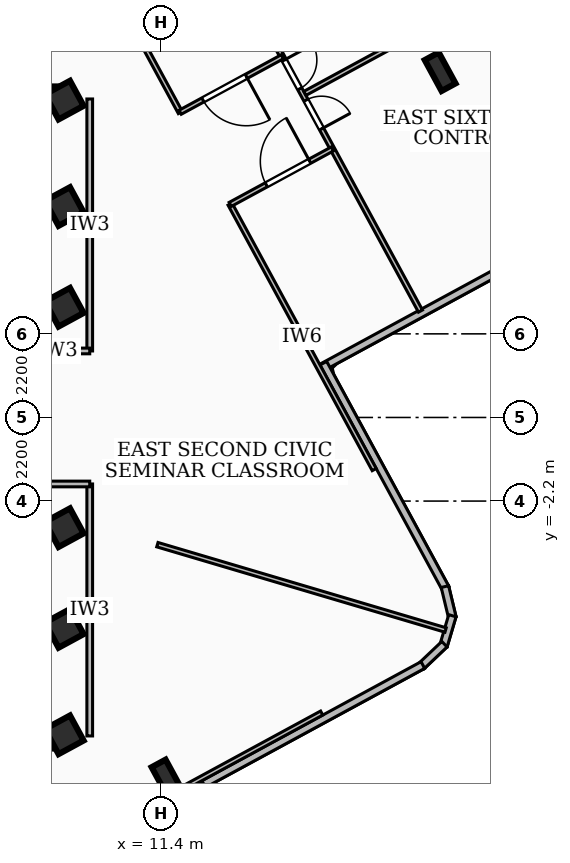
"""IFC4 building model, lengths in metres.
Left out: names, types, materials, properties, quantities, classifications, styles, units other than length and angle.
Written with IfcOpenShell. Run it as: python <this file> out.ifc"""

import sys

from ifc_helpers import new_model, si_unit, direction, frame, frame_2d, origin, origin_2d, place, context, subcontext, project, spatial, rectangle, i_section, extrude, element, fill, save


model = new_model("IFC4")
c1 = context("Model", 3, precision=1e-05, world=origin(), true_north=direction((0.0, 1.0)))
c2 = subcontext(c1, "Body", "Model", "MODEL_VIEW")
j1 = project(units=[si_unit("LENGTHUNIT", "METRE"), si_unit("PLANEANGLEUNIT", "RADIAN")], contexts=[c1])
p1 = place(None, origin())
s1 = spatial("IfcSite", under=j1, at=p1, CompositionType="ELEMENT")
p2 = place(p1, origin())
s2 = spatial("IfcBuilding", under=s1, at=p2, CompositionType="ELEMENT")
p3 = place(p2, frame((0.0, 0.0, 200.88)))
s3 = spatial("IfcBuildingStorey", under=s2, at=p3, CompositionType="ELEMENT", Elevation=200.88)
for number, where, z_axis, x_axis in (
    (1, (-8.78, 8.51, 0.0), (0.0, 0.0, 1.0), (1.0, 0.0, 0.0)),
    (2, (8.78, -8.51, 0.0), (0.0, 0.0, 1.0), (-1.0, 0.0, 0.0)),
):
    element("IfcWall", number, at=place(p3, frame(where, z_axis=z_axis, x_axis=x_axis)), inside=s3, PredefinedType="SHEAR", context=c2, shape_type="SweptSolid", body=[
        extrude(rectangle(XDim=17.56, YDim=0.4, at=frame_2d((8.78, 0.0))), origin(), (0.0, 0.0, 1.0), 4.06),
    ])
for number, where, z_axis, x_axis in (
    (3, (8.85, -5.55, 0.0), (0.0, 0.0, 1.0), (0.879, 0.477, 0.0)),
    (4, (8.85, -2.9, 0.0), (0.0, 0.0, 1.0), (0.879, 0.477, 0.0)),
    (5, (8.85, 2.9, 0.0), (0.0, 0.0, 1.0), (0.879, 0.477, 0.0)),
    (6, (8.85, 5.55, 0.0), (0.0, 0.0, 1.0), (0.879, 0.477, 0.0)),
    (7, (8.85, -8.35, 0.0), (0.0, 0.0, 1.0), (0.879, 0.477, 0.0)),
    (8, (8.85, 8.35, 0.0), (0.0, 0.0, 1.0), (0.879, 0.477, 0.0)),
):
    element("IfcColumn", number, at=place(p3, frame(where, z_axis=z_axis, x_axis=x_axis)), inside=s3, PredefinedType="COLUMN", context=c2, shape_type="SweptSolid", body=[
        extrude(rectangle(XDim=0.75, YDim=0.75, at=origin_2d()), origin(), (0.0, 0.0, 1.0), 4.32),
    ])
for number, where, z_axis, x_axis in (
    (9, (18.741, 9.097, 0.0), (0.0, 0.0, 1.0), (0.879, 0.477, 0.0)),
    (10, (11.554, -9.51, 0.0), (0.0, 0.0, 1.0), (0.879, 0.477, 0.0)),
):
    element("IfcColumn", number, at=place(p3, frame(where, z_axis=z_axis, x_axis=x_axis)), inside=s3, PredefinedType="COLUMN", context=c2, shape_type="SweptSolid", body=[
        extrude(i_section(OverallWidth=0.418, OverallDepth=0.927, WebThickness=0.019, FlangeThickness=0.032, at=origin_2d()), origin(), (0.0, 0.0, 1.0), 4.32),
    ])
p4 = place(p3, frame((19.411, 16.015, 0.0), z_axis=(0.0, 0.0, 1.0), x_axis=(0.477136087368, -0.878829422659, 0.0)))
e11 = element("IfcWall", 11, at=p4, inside=s3, PredefinedType="SOLIDWALL", context=c2, shape_type="SweptSolid", body=[
    extrude(rectangle(XDim=9.624, YDim=0.2, at=frame_2d((4.812, 0.0))), origin(), (0.0, 0.0, 1.0), 4.06),
])
p5 = place(p4, frame((6.607, 0.0, 0.85)))
e12 = element("IfcOpeningElement", 12, at=p5, cuts=e11, PredefinedType="OPENING", context=c2, shape_type="SweptSolid", body=[
    extrude(rectangle(XDim=1.8, YDim=2.0, at=frame_2d((0.9, 1.0))), frame((0.0, 0.11, 0.0), z_axis=(0.0, -1.0, 0.0), x_axis=(1.0, 0.0, 0.0)), (0.0, 0.0, 1.0), 0.22),
])
p6 = place(p3, frame((23.405, 5.539, 0.0), z_axis=(0.0, 0.0, 1.0), x_axis=(-0.878806785067, -0.477177780832, 0.0)))
e13 = element("IfcWall", 13, at=p6, inside=s3, PredefinedType="SOLIDWALL", context=c2, shape_type="SweptSolid", body=[
    extrude(rectangle(XDim=8.842, YDim=0.2, at=frame_2d((4.421, 0.0))), origin(), (0.0, 0.0, 1.0), 4.06),
])
p7 = place(p6, frame((0.85, 0.0, 0.85)))
e14 = element("IfcOpeningElement", 14, at=p7, cuts=e13, PredefinedType="OPENING", context=c2, shape_type="SweptSolid", body=[
    extrude(rectangle(XDim=1.8, YDim=1.8, at=frame_2d((0.9, 0.9))), frame((0.0, 0.11, 0.0), z_axis=(0.0, -1.0, 0.0), x_axis=(1.0, 0.0, 0.0)), (0.0, 0.0, 1.0), 0.22),
])
p8 = place(p3, frame((15.667, 1.428, 0.0), z_axis=(0.0, 0.0, 1.0), x_axis=(0.477219733162, -0.878784004338, 0.0)))
e15 = element("IfcWall", 15, at=p8, inside=s3, PredefinedType="SOLIDWALL", context=c2, shape_type="SweptSolid", body=[
    extrude(rectangle(XDim=6.741, YDim=0.2, at=frame_2d((3.371, 0.0))), origin(), (0.0, 0.0, 1.0), 4.06),
])
p9 = place(p3, frame((18.866, -4.45, 0.0), z_axis=(0.0, 0.0, 1.0), x_axis=(0.233890685703, -0.972262900219, 0.0)))
e16 = element("IfcWall", 16, at=p9, inside=s3, PredefinedType="SOLIDWALL", context=c2, shape_type="SweptSolid", body=[
    extrude(rectangle(XDim=0.838, YDim=0.2, at=frame_2d((0.419, 0.0))), origin(), (0.0, 0.0, 1.0), 4.06),
])
p10 = place(p3, frame((19.063, -5.217, 0.0), z_axis=(0.0, 0.0, 1.0), x_axis=(-0.283866368736, -0.958863850972, 0.0)))
e17 = element("IfcWall", 17, at=p10, inside=s3, PredefinedType="SOLIDWALL", context=c2, shape_type="SweptSolid", body=[
    extrude(rectangle(XDim=0.824, YDim=0.2, at=frame_2d((0.412, 0.0))), origin(), (0.0, 0.0, 1.0), 4.06),
])
p11 = place(p3, frame((18.854, -5.966, 0.0), z_axis=(0.0, 0.0, 1.0), x_axis=(-0.725362992084, -0.688366566384, 0.0)))
e18 = element("IfcWall", 18, at=p11, inside=s3, PredefinedType="SOLIDWALL", context=c2, shape_type="SweptSolid", body=[
    extrude(rectangle(XDim=0.838, YDim=0.2, at=frame_2d((0.419, 0.0))), origin(), (0.0, 0.0, 1.0), 4.06),
])
p12 = place(p3, frame((18.286, -6.514, 0.0), z_axis=(0.0, 0.0, 1.0), x_axis=(-0.878808744224, -0.477174172682, 0.0)))
e19 = element("IfcWall", 19, at=p12, inside=s3, PredefinedType="SOLIDWALL", context=c2, shape_type="SweptSolid", body=[
    extrude(rectangle(XDim=6.742, YDim=0.2, at=frame_2d((3.371, 0.0))), origin(), (0.0, 0.0, 1.0), 4.06),
])
p13 = place(p3, frame((12.393, -9.623, 0.0), z_axis=(0.0, 0.0, 1.0), x_axis=(0.47719284897, -0.878798603146, 0.0)))
e20 = element("IfcWall", 20, at=p13, inside=s3, PredefinedType="SOLIDWALL", context=c2, shape_type="SweptSolid", body=[
    extrude(rectangle(XDim=4.641, YDim=0.2, at=frame_2d((2.321, 0.0))), origin(), (0.0, 0.0, 1.0), 4.06),
])
p14 = place(p3, frame((9.52, 1.75, 0.0), z_axis=(0.0, 0.0, 1.0), x_axis=(0.0, 1.0, 0.0)))
e21 = element("IfcWall", 21, at=p14, inside=s3, PredefinedType="PARTITIONING", context=c2, shape_type="SweptSolid", body=[
    extrude(rectangle(XDim=6.63, YDim=0.15, at=frame_2d((3.315, 0.0))), origin(), (0.0, 0.0, 1.0), 3.43),
])
p15 = place(p3, frame((7.85, 1.75, 0.0), z_axis=(0.0, 0.0, 1.0), x_axis=(1.0, 0.0, 0.0)))
e22 = element("IfcWall", 22, at=p15, inside=s3, PredefinedType="PARTITIONING", context=c2, shape_type="SweptSolid", body=[
    extrude(rectangle(XDim=1.67, YDim=0.15, at=frame_2d((0.835, 0.0))), origin(), (0.0, 0.0, 1.0), 3.29),
])
p16 = place(p3, frame((9.52, -8.38, 0.0), z_axis=(0.0, 0.0, 1.0), x_axis=(0.0, 1.0, 0.0)))
e23 = element("IfcWall", 23, at=p16, inside=s3, PredefinedType="PARTITIONING", context=c2, shape_type="SweptSolid", body=[
    extrude(rectangle(XDim=6.63, YDim=0.15, at=frame_2d((3.315, 0.0))), origin(), (0.0, 0.0, 1.0), 4.06),
])
p17 = place(p3, frame((7.85, -1.75, 0.0), z_axis=(0.0, 0.0, 1.0), x_axis=(1.0, 0.0, 0.0)))
e24 = element("IfcWall", 24, at=p17, inside=s3, PredefinedType="PARTITIONING", context=c2, shape_type="SweptSolid", body=[
    extrude(rectangle(XDim=1.67, YDim=0.15, at=frame_2d((0.835, 0.0))), origin(), (0.0, 0.0, 1.0), 3.29),
])
p18 = place(p3, frame((11.3, -3.347, 0.0), z_axis=(0.0, 0.0, 1.0), x_axis=(0.958832980981, -0.283970622747, 0.0)))
e25 = element("IfcWall", 25, at=p18, inside=s3, PredefinedType="PARTITIONING", context=c2, shape_type="SweptSolid", body=[
    extrude(rectangle(XDim=7.91, YDim=0.12, at=frame_2d((3.955, 0.0))), origin(), (0.0, 0.0, 1.0), 4.06),
])
p19 = place(p3, frame((11.905, 8.023, 0.0), z_axis=(0.0, 0.0, 1.0), x_axis=(-0.477237565532, 0.878774320315, 0.0)))
e26 = element("IfcWall", 26, at=p19, inside=s3, PredefinedType="PARTITIONING", context=c2, shape_type="SweptSolid", body=[
    extrude(rectangle(XDim=7.95, YDim=0.12, at=frame_2d((3.975, 0.0))), origin(), (0.0, 0.0, 1.0), 3.43),
])
p20 = place(p3, frame((17.006, -1.372, 0.0), z_axis=(0.0, 0.0, 1.0), x_axis=(-0.477209766936, 0.878789416379, 0.0)))
e27 = element("IfcWall", 27, at=p20, inside=s3, PredefinedType="PARTITIONING", context=c2, shape_type="SweptSolid", body=[
    extrude(rectangle(XDim=7.951, YDim=0.12, at=frame_2d((3.975, 0.0))), origin(), (0.0, 0.0, 1.0), 4.06),
])
p21 = place(p3, frame((14.589, 9.491, 0.0), z_axis=(0.0, 0.0, 1.0), x_axis=(-0.878839093996, -0.477118273454, 0.0)))
e28 = element("IfcWall", 28, at=p21, inside=s3, PredefinedType="PARTITIONING", context=c2, shape_type="SweptSolid", body=[
    extrude(rectangle(XDim=3.06, YDim=0.12, at=frame_2d((1.53, 0.0))), origin(), (0.0, 0.0, 1.0), 3.43),
])
p22 = place(p21, frame((1.08, 0.0, 0.0)))
e29 = element("IfcOpeningElement", 29, at=p22, cuts=e28, PredefinedType="OPENING", context=c2, shape_type="SweptSolid", body=[
    extrude(rectangle(XDim=1.3, YDim=2.1, at=frame_2d((0.65, 1.05))), frame((0.0, 0.07, 0.0), z_axis=(0.0, -1.0, 0.0), x_axis=(1.0, 0.0, 0.0)), (0.0, 0.0, 1.0), 0.14),
])
p23 = place(p3, frame((13.217, 5.606, 0.0), z_axis=(0.0, 0.0, 1.0), x_axis=(0.87882092953, 0.477151730397, 0.0)))
e30 = element("IfcWall", 30, at=p23, inside=s3, PredefinedType="PARTITIONING", context=c2, shape_type="SweptSolid", body=[
    extrude(rectangle(XDim=3.06, YDim=0.12, at=frame_2d((1.53, 0.0))), origin(), (0.0, 0.0, 1.0), 4.06),
])
p24 = place(p23, frame((1.08, 0.0, 0.0)))
e31 = element("IfcOpeningElement", 31, at=p24, cuts=e30, PredefinedType="OPENING", context=c2, shape_type="SweptSolid", body=[
    extrude(rectangle(XDim=1.3, YDim=2.1, at=frame_2d((0.65, 1.05))), frame((0.0, 0.07, 0.0), z_axis=(0.0, -1.0, 0.0), x_axis=(1.0, 0.0, 0.0)), (0.0, 0.0, 1.0), 0.14),
])
p25 = place(p3, frame((15.181, 8.527, 0.0), z_axis=(0.0, 0.0, 1.0), x_axis=(0.878776100726, 0.477234287109, 0.0)))
e32 = element("IfcWall", 32, at=p25, inside=s3, PredefinedType="PARTITIONING", context=c2, shape_type="SweptSolid", body=[
    extrude(rectangle(XDim=7.225, YDim=0.12, at=frame_2d((3.612, 0.0))), origin(), (0.0, 0.0, 1.0), 3.43),
])
p26 = place(p3, frame((12.272, 13.758, 0.0), z_axis=(0.0, 0.0, 1.0), x_axis=(0.477201164774, -0.878794087564, 0.0)))
e33 = element("IfcWall", 33, at=p26, inside=s3, PredefinedType="PARTITIONING", context=c2, shape_type="SweptSolid", body=[
    extrude(rectangle(XDim=12.47, YDim=0.12, at=frame_2d((6.235, 0.0))), origin(), (0.0, 0.0, 1.0), 3.43),
])
p27 = place(p26, frame((6.155, 0.0, 0.0)))
e34 = element("IfcOpeningElement", 34, at=p27, cuts=e33, PredefinedType="OPENING", context=c2, shape_type="SweptSolid", body=[
    extrude(rectangle(XDim=0.86, YDim=2.04, at=frame_2d((0.43, 1.02))), frame((0.0, 0.07, 0.0), z_axis=(0.0, -1.0, 0.0), x_axis=(1.0, 0.0, 0.0)), (0.0, 0.0, 1.0), 0.14),
])
p28 = place(p26, frame((4.955, 0.0, 0.0)))
e35 = element("IfcOpeningElement", 35, at=p28, cuts=e33, PredefinedType="OPENING", context=c2, shape_type="SweptSolid", body=[
    extrude(rectangle(XDim=0.86, YDim=2.04, at=frame_2d((0.43, 1.02))), frame((0.0, 0.07, 0.0), z_axis=(0.0, -1.0, 0.0), x_axis=(1.0, 0.0, 0.0)), (0.0, 0.0, 1.0), 0.14),
])
p29 = place(p3, frame((15.624, -7.777, 0.0), z_axis=(0.0, 0.0, 1.0), x_axis=(-0.878797236248, -0.477195366242, 0.0)))
e36 = element("IfcWall", 36, at=p29, inside=s3, PredefinedType="PARTITIONING", context=c2, shape_type="SweptSolid", body=[
    extrude(rectangle(XDim=20.04, YDim=0.12, at=frame_2d((10.02, 0.0))), origin(), (0.0, 0.0, 1.0), 3.43),
])
p30 = place(p29, frame((9.419, 0.0, 0.0)))
e37 = element("IfcOpeningElement", 37, at=p30, cuts=e36, PredefinedType="OPENING", context=c2, shape_type="SweptSolid", body=[
    extrude(rectangle(XDim=1.2, YDim=2.1, at=frame_2d((0.6, 1.05))), frame((0.0, 0.07, 0.0), z_axis=(0.0, -1.0, 0.0), x_axis=(1.0, 0.0, 0.0)), (0.0, 0.0, 1.0), 0.14),
])
p31 = place(p22, origin())
e38 = element("IfcDoor", 38, at=p31, inside=s3, OperationType="SINGLE_SWING_LEFT", PredefinedType="DOOR", context=c2, shape_type="SweptSolid", body=[
    extrude(rectangle(XDim=1.3, YDim=2.1, at=frame_2d((0.65, 1.05))), frame((0.0, 0.025, 0.0), z_axis=(0.0, -1.0, 0.0), x_axis=(1.0, 0.0, 0.0)), (0.0, 0.0, 1.0), 0.05),
])
fill(e29, e38)
p32 = place(p24, origin())
e39 = element("IfcDoor", 39, at=p32, inside=s3, OperationType="SINGLE_SWING_RIGHT", PredefinedType="DOOR", context=c2, shape_type="SweptSolid", body=[
    extrude(rectangle(XDim=1.3, YDim=2.1, at=frame_2d((0.65, 1.05))), frame((0.0, 0.025, 0.0), z_axis=(0.0, -1.0, 0.0), x_axis=(1.0, 0.0, 0.0)), (0.0, 0.0, 1.0), 0.05),
])
fill(e31, e39)
p33 = place(p27, origin())
e40 = element("IfcDoor", 40, at=p33, inside=s3, OperationType="SINGLE_SWING_RIGHT", PredefinedType="DOOR", context=c2, shape_type="SweptSolid", body=[
    extrude(rectangle(XDim=0.86, YDim=2.04, at=frame_2d((0.43, 1.02))), frame((0.0, 0.025, 0.0), z_axis=(0.0, -1.0, 0.0), x_axis=(1.0, 0.0, 0.0)), (0.0, 0.0, 1.0), 0.05),
])
fill(e34, e40)
p34 = place(p28, origin())
e41 = element("IfcDoor", 41, at=p34, inside=s3, OperationType="SINGLE_SWING_LEFT", PredefinedType="DOOR", context=c2, shape_type="SweptSolid", body=[
    extrude(rectangle(XDim=0.86, YDim=2.04, at=frame_2d((0.43, 1.02))), frame((0.0, 0.025, 0.0), z_axis=(0.0, -1.0, 0.0), x_axis=(1.0, 0.0, 0.0)), (0.0, 0.0, 1.0), 0.05),
])
fill(e35, e41)
save(model, sys.argv[1])
